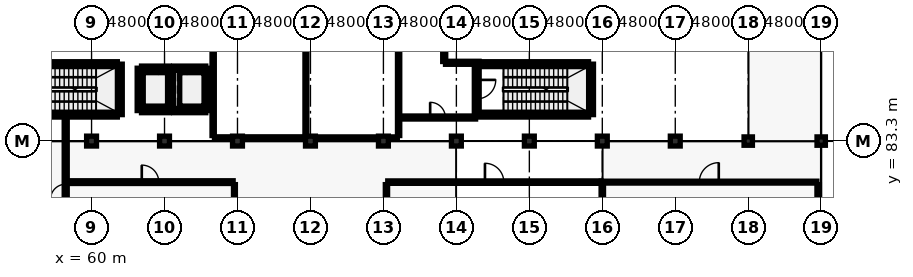
"""IFC4 building model, lengths in metres.
Left out: names, types, materials, properties, quantities, classifications, styles, units other than length and angle.
Written with IfcOpenShell. Run it as: python <this file> out.ifc"""

import sys

from ifc_helpers import new_model, si_unit, direction, frame, frame_2d, origin, origin_2d, place, context, subcontext, project, spatial, rectangle, extrude, element, fill, save


model = new_model("IFC4")
c1 = context("Model", 3, precision=1e-05, world=origin(), true_north=direction((0.0, 1.0)))
c2 = subcontext(c1, "Body", "Model", "MODEL_VIEW")
j1 = project(units=[si_unit("LENGTHUNIT", "METRE"), si_unit("PLANEANGLEUNIT", "RADIAN")], contexts=[c1])
p1 = place(None, origin())
s1 = spatial("IfcSite", under=j1, at=p1, CompositionType="ELEMENT")
p2 = place(p1, origin())
s2 = spatial("IfcBuilding", under=s1, at=p2, CompositionType="ELEMENT")
p3 = place(p2, origin())
s3 = spatial("IfcBuildingStorey", under=s2, at=p3, CompositionType="ELEMENT", Elevation=0.0)
for number, where, z_axis, x_axis in (
    (1, (60.0, 83.3, 0.0), (0.0, 0.0, 1.0), (1.0, 0.0, 0.0)),
    (2, (64.8, 83.3, 0.0), (0.0, 0.0, 1.0), (1.0, 0.0, 0.0)),
    (3, (69.6, 83.3, 0.0), (0.0, 0.0, 1.0), (1.0, 0.0, 0.0)),
    (4, (74.4, 83.3, 0.0), (0.0, 0.0, 1.0), (1.0, 0.0, 0.0)),
    (5, (79.2, 83.3, 0.0), (0.0, 0.0, 1.0), (1.0, 0.0, 0.0)),
    (6, (84.0, 83.3, 0.0), (0.0, 0.0, 1.0), (1.0, 0.0, 0.0)),
    (7, (88.8, 83.3, 0.0), (0.0, 0.0, 1.0), (1.0, 0.0, 0.0)),
    (8, (93.6, 83.3, 0.0), (0.0, 0.0, 1.0), (1.0, 0.0, 0.0)),
    (9, (98.4, 83.3, 0.0), (0.0, 0.0, 1.0), (1.0, 0.0, 0.0)),
):
    element("IfcColumn", number, at=place(p3, frame(where, z_axis=z_axis, x_axis=x_axis)), inside=s3, PredefinedType="COLUMN", context=c2, shape_type="SweptSolid", body=[
        extrude(rectangle(XDim=0.65, YDim=0.65, at=origin_2d()), origin(), (0.0, 0.0, 1.0), 4.7),
    ])
for number, where, z_axis, x_axis in (
    (10, (103.2, 83.3, 0.0), (0.0, 0.0, 1.0), (1.0, 0.0, 0.0)),
    (11, (108.0, 83.3, 0.0), (0.0, 0.0, 1.0), (1.0, 0.0, 0.0)),
):
    element("IfcColumn", number, at=place(p3, frame(where, z_axis=z_axis, x_axis=x_axis)), inside=s3, PredefinedType="COLUMN", context=c2, shape_type="SweptSolid", body=[
        extrude(rectangle(XDim=0.55, YDim=0.55, at=origin_2d()), origin(), (0.0, 0.0, 1.0), 4.7),
    ])
p4 = place(p3, frame((54.505, 85.04, 0.0), z_axis=(0.0, 0.0, 1.0), x_axis=(1.0, 0.0, 0.0)))
e12 = element("IfcWall", 12, at=p4, inside=s3, PredefinedType="SHEAR", context=c2, shape_type="SweptSolid", body=[
    extrude(rectangle(XDim=7.19, YDim=0.32, at=frame_2d((3.595, 0.0))), origin(), (0.0, 0.0, 1.0), 4.7),
])
p5 = place(p3, frame((61.86, 85.04, 0.0), z_axis=(0.0, 0.0, 1.0), x_axis=(0.0, 1.0, 0.0)))
e13 = element("IfcWall", 13, at=p5, inside=s3, PredefinedType="SHEAR", context=c2, shape_type="SweptSolid", body=[
    extrude(rectangle(XDim=3.32, YDim=0.32, at=frame_2d((1.66, 0.0))), origin(), (0.0, 0.0, 1.0), 4.7),
])
p6 = place(p3, frame((61.695, 88.36, 0.0), z_axis=(0.0, 0.0, 1.0), x_axis=(-1.0, 0.0, 0.0)))
e14 = element("IfcWall", 14, at=p6, inside=s3, PredefinedType="SHEAR", context=c2, shape_type="SweptSolid", body=[
    extrude(rectangle(XDim=7.19, YDim=0.32, at=frame_2d((3.595, 0.0))), origin(), (0.0, 0.0, 1.0), 4.7),
])
p7 = place(p3, frame((63.286, 85.307, 0.0), z_axis=(0.0, 0.0, 1.0), x_axis=(1.0, 0.0, 0.0)))
e15 = element("IfcWall", 15, at=p7, inside=s3, PredefinedType="SHEAR", context=c2, shape_type="SweptSolid", body=[
    extrude(rectangle(XDim=1.828, YDim=0.28, at=frame_2d((0.914, 0.0))), origin(), (0.0, 0.0, 1.0), 4.7),
])
p8 = place(p3, frame((65.259, 85.307, 0.0), z_axis=(0.0, 0.0, 1.0), x_axis=(0.0, 1.0, 0.0)))
e16 = element("IfcWall", 16, at=p8, inside=s3, PredefinedType="SHEAR", context=c2, shape_type="SweptSolid", body=[
    extrude(rectangle(XDim=2.787, YDim=0.28, at=frame_2d((1.393, 0.0))), origin(), (0.0, 0.0, 1.0), 4.7),
])
p9 = place(p3, frame((65.114, 88.093, 0.0), z_axis=(0.0, 0.0, 1.0), x_axis=(-1.0, 0.0, 0.0)))
e17 = element("IfcWall", 17, at=p9, inside=s3, PredefinedType="SHEAR", context=c2, shape_type="SweptSolid", body=[
    extrude(rectangle(XDim=1.828, YDim=0.28, at=frame_2d((0.914, 0.0))), origin(), (0.0, 0.0, 1.0), 4.7),
])
p10 = place(p9, frame((0.314, 0.0, 0.0)))
e18 = element("IfcOpeningElement", 18, at=p10, cuts=e17, PredefinedType="OPENING", context=c2, shape_type="SweptSolid", body=[
    extrude(rectangle(XDim=1.2, YDim=2.15, at=frame_2d((0.6, 1.075))), frame((0.0, 0.152, 0.0), z_axis=(0.0, -1.0, 0.0), x_axis=(1.0, 0.0, 0.0)), (0.0, 0.0, 1.0), 0.304),
])
p11 = place(p3, frame((63.141, 88.093, 0.0), z_axis=(0.0, 0.0, 1.0), x_axis=(0.0, -1.0, 0.0)))
e19 = element("IfcWall", 19, at=p11, inside=s3, PredefinedType="SHEAR", context=c2, shape_type="SweptSolid", body=[
    extrude(rectangle(XDim=2.787, YDim=0.28, at=frame_2d((1.393, 0.0))), origin(), (0.0, 0.0, 1.0), 4.7),
])
p12 = place(p3, frame((65.404, 85.307, 0.0), z_axis=(0.0, 0.0, 1.0), x_axis=(1.0, 0.0, 0.0)))
e20 = element("IfcWall", 20, at=p12, inside=s3, PredefinedType="SHEAR", context=c2, shape_type="SweptSolid", body=[
    extrude(rectangle(XDim=2.11, YDim=0.28, at=frame_2d((1.055, 0.0))), origin(), (0.0, 0.0, 1.0), 4.7),
])
p13 = place(p3, frame((67.659, 85.307, 0.0), z_axis=(0.0, 0.0, 1.0), x_axis=(0.0, 1.0, 0.0)))
e21 = element("IfcWall", 21, at=p13, inside=s3, PredefinedType="SHEAR", context=c2, shape_type="SweptSolid", body=[
    extrude(rectangle(XDim=2.787, YDim=0.28, at=frame_2d((1.393, 0.0))), origin(), (0.0, 0.0, 1.0), 4.7),
])
p14 = place(p3, frame((67.514, 88.093, 0.0), z_axis=(0.0, 0.0, 1.0), x_axis=(-1.0, 0.0, 0.0)))
e22 = element("IfcWall", 22, at=p14, inside=s3, PredefinedType="SHEAR", context=c2, shape_type="SweptSolid", body=[
    extrude(rectangle(XDim=2.11, YDim=0.28, at=frame_2d((1.055, 0.0))), origin(), (0.0, 0.0, 1.0), 4.7),
])
p15 = place(p14, frame((0.455, 0.0, 0.0)))
e23 = element("IfcOpeningElement", 23, at=p15, cuts=e22, PredefinedType="OPENING", context=c2, shape_type="SweptSolid", body=[
    extrude(rectangle(XDim=1.2, YDim=2.15, at=frame_2d((0.6, 1.075))), frame((0.0, 0.152, 0.0), z_axis=(0.0, -1.0, 0.0), x_axis=(1.0, 0.0, 0.0)), (0.0, 0.0, 1.0), 0.304),
])
p16 = place(p3, frame((85.505, 85.04, 0.0), z_axis=(0.0, 0.0, 1.0), x_axis=(1.0, 0.0, 0.0)))
e24 = element("IfcWall", 24, at=p16, inside=s3, PredefinedType="SHEAR", context=c2, shape_type="SweptSolid", body=[
    extrude(rectangle(XDim=7.19, YDim=0.32, at=frame_2d((3.595, 0.0))), origin(), (0.0, 0.0, 1.0), 4.7),
])
p17 = place(p3, frame((92.86, 85.04, 0.0), z_axis=(0.0, 0.0, 1.0), x_axis=(0.0, 1.0, 0.0)))
e25 = element("IfcWall", 25, at=p17, inside=s3, PredefinedType="SHEAR", context=c2, shape_type="SweptSolid", body=[
    extrude(rectangle(XDim=3.32, YDim=0.32, at=frame_2d((1.66, 0.0))), origin(), (0.0, 0.0, 1.0), 4.7),
])
p18 = place(p3, frame((92.695, 88.36, 0.0), z_axis=(0.0, 0.0, 1.0), x_axis=(-1.0, 0.0, 0.0)))
e26 = element("IfcWall", 26, at=p18, inside=s3, PredefinedType="SHEAR", context=c2, shape_type="SweptSolid", body=[
    extrude(rectangle(XDim=7.19, YDim=0.32, at=frame_2d((3.595, 0.0))), origin(), (0.0, 0.0, 1.0), 4.7),
])
p19 = place(p3, frame((85.34, 88.36, 0.0), z_axis=(0.0, 0.0, 1.0), x_axis=(0.0, -1.0, 0.0)))
e27 = element("IfcWall", 27, at=p19, inside=s3, PredefinedType="SHEAR", context=c2, shape_type="SweptSolid", body=[
    extrude(rectangle(XDim=3.32, YDim=0.32, at=frame_2d((1.66, 0.0))), origin(), (0.0, 0.0, 1.0), 4.7),
])
p20 = place(p19, frame((1.035, 0.0, 0.0)))
e28 = element("IfcOpeningElement", 28, at=p20, cuts=e27, PredefinedType="OPENING", context=c2, shape_type="SweptSolid", body=[
    extrude(rectangle(XDim=1.25, YDim=2.2, at=frame_2d((0.625, 1.1))), frame((0.0, 0.172, 0.0), z_axis=(0.0, -1.0, 0.0), x_axis=(1.0, 0.0, 0.0)), (0.0, 0.0, 1.0), 0.344),
])
p21 = place(p3, frame((58.3, 76.002, 0.0), z_axis=(0.0, 0.0, 1.0), x_axis=(0.0, 1.0, 0.0)))
e29 = element("IfcWall", 29, at=p21, inside=s3, PredefinedType="PARTITIONING", context=c2, shape_type="SweptSolid", body=[
    extrude(rectangle(XDim=8.866, YDim=0.2, at=frame_2d((4.433, 0.0))), origin(), (0.0, 0.0, 1.0), 4.035),
])
p22 = place(p21, frame((3.461, 0.0, 0.0)))
e30 = element("IfcOpeningElement", 30, at=p22, cuts=e29, PredefinedType="OPENING", context=c2, shape_type="SweptSolid", body=[
    extrude(rectangle(XDim=1.0, YDim=2.15, at=frame_2d((0.5, 1.075))), frame((0.0, 0.112, 0.0), z_axis=(0.0, -1.0, 0.0), x_axis=(1.0, 0.0, 0.0)), (0.0, 0.0, 1.0), 0.224),
])
p23 = place(p3, frame((80.285, 84.85, 0.0), z_axis=(0.0, 0.0, 1.0), x_axis=(1.0, 0.0, 0.0)))
e31 = element("IfcWall", 31, at=p23, inside=s3, PredefinedType="PARTITIONING", context=c2, shape_type="SweptSolid", body=[
    extrude(rectangle(XDim=4.98, YDim=0.2, at=frame_2d((2.49, 0.0))), origin(), (0.0, 0.0, 1.0), 3.985),
])
p24 = place(p23, frame((1.99, 0.0, 0.0)))
e32 = element("IfcOpeningElement", 32, at=p24, cuts=e31, PredefinedType="OPENING", context=c2, shape_type="SweptSolid", body=[
    extrude(rectangle(XDim=1.0, YDim=2.15, at=frame_2d((0.5, 1.075))), frame((0.0, 0.112, 0.0), z_axis=(0.0, -1.0, 0.0), x_axis=(1.0, 0.0, 0.0)), (0.0, 0.0, 1.0), 0.224),
])
p25 = place(p3, frame((58.412, 80.6, 0.0), z_axis=(0.0, 0.0, 1.0), x_axis=(1.0, 0.0, 0.0)))
e33 = element("IfcWall", 33, at=p25, inside=s3, PredefinedType="PARTITIONING", context=c2, shape_type="SweptSolid", body=[
    extrude(rectangle(XDim=10.903, YDim=0.18, at=frame_2d((5.451, 0.0))), origin(), (0.0, 0.0, 1.0), 4.7),
])
p26 = place(p25, frame((4.892, 0.0, 0.0)))
e34 = element("IfcOpeningElement", 34, at=p26, cuts=e33, PredefinedType="OPENING", context=c2, shape_type="SweptSolid", body=[
    extrude(rectangle(XDim=1.12, YDim=2.2, at=frame_2d((0.56, 1.1))), frame((0.0, 0.102, 0.0), z_axis=(0.0, -1.0, 0.0), x_axis=(1.0, 0.0, 0.0)), (0.0, 0.0, 1.0), 0.204),
])
p27 = place(p3, frame((79.485, 80.6, 0.0), z_axis=(0.0, 0.0, 1.0), x_axis=(1.0, 0.0, 0.0)))
e35 = element("IfcWall", 35, at=p27, inside=s3, PredefinedType="PARTITIONING", context=c2, shape_type="SweptSolid", body=[
    extrude(rectangle(XDim=14.03, YDim=0.16, at=frame_2d((7.015, 0.0))), origin(), (0.0, 0.0, 1.0), 3.985),
])
p28 = place(p27, frame((6.395, 0.0, 0.0)))
e36 = element("IfcOpeningElement", 36, at=p28, cuts=e35, PredefinedType="OPENING", context=c2, shape_type="SweptSolid", body=[
    extrude(rectangle(XDim=1.24, YDim=2.2, at=frame_2d((0.62, 1.1))), frame((0.0, 0.092, 0.0), z_axis=(0.0, -1.0, 0.0), x_axis=(1.0, 0.0, 0.0)), (0.0, 0.0, 1.0), 0.184),
])
p29 = place(p3, frame((93.527, 80.6, 0.0), z_axis=(0.0, 0.0, 1.0), x_axis=(1.0, 0.0, 0.0)))
e37 = element("IfcWall", 37, at=p29, inside=s3, PredefinedType="PARTITIONING", context=c2, shape_type="SweptSolid", body=[
    extrude(rectangle(XDim=14.188, YDim=0.125, at=frame_2d((7.094, 0.0))), origin(), (0.0, 0.0, 1.0), 4.035),
])
p30 = place(p29, frame((6.454, 0.0, 0.0)))
e38 = element("IfcOpeningElement", 38, at=p30, cuts=e37, PredefinedType="OPENING", context=c2, shape_type="SweptSolid", body=[
    extrude(rectangle(XDim=1.28, YDim=2.22, at=frame_2d((0.64, 1.11))), frame((0.0, 0.074, 0.0), z_axis=(0.0, -1.0, 0.0), x_axis=(1.0, 0.0, 0.0)), (0.0, 0.0, 1.0), 0.149),
])
p31 = place(p3, frame((68.085, 83.5, 0.0), z_axis=(0.0, 0.0, 1.0), x_axis=(1.0, 0.0, 0.0)))
e39 = element("IfcWall", 39, at=p31, inside=s3, PredefinedType="PARTITIONING", context=c2, shape_type="SweptSolid", body=[
    extrude(rectangle(XDim=5.978, YDim=0.16, at=frame_2d((2.989, 0.0))), origin(), (0.0, 0.0, 1.0), 3.985),
])
p32 = place(p3, frame((74.555, 83.5, 0.0), z_axis=(0.0, 0.0, 1.0), x_axis=(1.0, 0.0, 0.0)))
e40 = element("IfcWall", 40, at=p32, inside=s3, PredefinedType="PARTITIONING", context=c2, shape_type="SweptSolid", body=[
    extrude(rectangle(XDim=5.56, YDim=0.15, at=frame_2d((2.78, 0.0))), origin(), (0.0, 0.0, 1.0), 3.985),
])
p33 = place(p3, frame((68.0, 83.665, 0.0), z_axis=(0.0, 0.0, 1.0), x_axis=(0.0, 1.0, 0.0)))
e41 = element("IfcWall", 41, at=p33, inside=s3, PredefinedType="PARTITIONING", context=c2, shape_type="SweptSolid", body=[
    extrude(rectangle(XDim=9.37, YDim=0.15, at=frame_2d((4.685, 0.0))), origin(), (0.0, 0.0, 1.0), 4.035),
])
p34 = place(p3, frame((74.1, 83.637, 0.0), z_axis=(0.0, 0.0, 1.0), x_axis=(0.0, 1.0, 0.0)))
e42 = element("IfcWall", 42, at=p34, inside=s3, PredefinedType="PARTITIONING", context=c2, shape_type="SweptSolid", body=[
    extrude(rectangle(XDim=9.461, YDim=0.125, at=frame_2d((4.73, 0.0))), origin(), (0.0, 0.0, 1.0), 3.985),
])
p35 = place(p3, frame((80.2, 83.665, 0.0), z_axis=(0.0, 0.0, 1.0), x_axis=(0.0, 1.0, 0.0)))
e43 = element("IfcWall", 43, at=p35, inside=s3, PredefinedType="PARTITIONING", context=c2, shape_type="SweptSolid", body=[
    extrude(rectangle(XDim=9.608, YDim=0.15, at=frame_2d((4.804, 0.0))), origin(), (0.0, 0.0, 1.0), 4.035),
])
p36 = place(p3, frame((83.285, 88.45, 0.0), z_axis=(0.0, 0.0, 1.0), x_axis=(1.0, 0.0, 0.0)))
e44 = element("IfcWall", 44, at=p36, inside=s3, PredefinedType="PARTITIONING", context=c2, shape_type="SweptSolid", body=[
    extrude(rectangle(XDim=2.208, YDim=0.2, at=frame_2d((1.104, 0.0))), origin(), (0.0, 0.0, 1.0), 3.985),
])
p37 = place(p3, frame((83.2, 88.535, 0.0), z_axis=(0.0, 0.0, 1.0), x_axis=(0.0, 1.0, 0.0)))
e45 = element("IfcWall", 45, at=p37, inside=s3, PredefinedType="PARTITIONING", context=c2, shape_type="SweptSolid", body=[
    extrude(rectangle(XDim=4.738, YDim=0.2, at=frame_2d((2.369, 0.0))), origin(), (0.0, 0.0, 1.0), 4.085),
])
p38 = place(p3, frame((69.4, 76.068, 0.0), z_axis=(0.0, 0.0, 1.0), x_axis=(0.0, 1.0, 0.0)))
e46 = element("IfcWall", 46, at=p38, inside=s3, PredefinedType="PARTITIONING", context=c2, shape_type="SweptSolid", body=[
    extrude(rectangle(XDim=4.367, YDim=0.125, at=frame_2d((2.184, 0.0))), origin(), (0.0, 0.0, 1.0), 4.035),
])
p39 = place(p3, frame((79.4, 76.068, 0.0), z_axis=(0.0, 0.0, 1.0), x_axis=(0.0, 1.0, 0.0)))
e47 = element("IfcWall", 47, at=p39, inside=s3, PredefinedType="PARTITIONING", context=c2, shape_type="SweptSolid", body=[
    extrude(rectangle(XDim=4.367, YDim=0.15, at=frame_2d((2.184, 0.0))), origin(), (0.0, 0.0, 1.0), 4.035),
])
p40 = place(p3, frame((93.6, 76.137, 0.0), z_axis=(0.0, 0.0, 1.0), x_axis=(0.0, 1.0, 0.0)))
e48 = element("IfcWall", 48, at=p40, inside=s3, PredefinedType="PARTITIONING", context=c2, shape_type="SweptSolid", body=[
    extrude(rectangle(XDim=4.388, YDim=0.16, at=frame_2d((2.194, 0.0))), origin(), (0.0, 0.0, 1.0), 4.135),
])
p41 = place(p3, frame((107.8, 76.068, 0.0), z_axis=(0.0, 0.0, 1.0), x_axis=(0.0, 1.0, 0.0)))
e49 = element("IfcWall", 49, at=p41, inside=s3, PredefinedType="PARTITIONING", context=c2, shape_type="SweptSolid", body=[
    extrude(rectangle(XDim=4.367, YDim=0.16, at=frame_2d((2.184, 0.0))), origin(), (0.0, 0.0, 1.0), 4.035),
])
p42 = place(p10, origin())
e50 = element("IfcDoor", 50, at=p42, inside=s3, OperationType="SLIDING_TO_LEFT", PredefinedType="DOOR", context=c2, shape_type="SweptSolid", body=[
    extrude(rectangle(XDim=1.2, YDim=2.15, at=frame_2d((0.6, 1.075))), frame((0.0, 0.025, 0.0), z_axis=(0.0, -1.0, 0.0), x_axis=(1.0, 0.0, 0.0)), (0.0, 0.0, 1.0), 0.05),
])
fill(e18, e50)
p43 = place(p15, origin())
e51 = element("IfcDoor", 51, at=p43, inside=s3, OperationType="SLIDING_TO_RIGHT", PredefinedType="DOOR", context=c2, shape_type="SweptSolid", body=[
    extrude(rectangle(XDim=1.2, YDim=2.15, at=frame_2d((0.6, 1.075))), frame((0.0, 0.025, 0.0), z_axis=(0.0, -1.0, 0.0), x_axis=(1.0, 0.0, 0.0)), (0.0, 0.0, 1.0), 0.05),
])
fill(e23, e51)
p44 = place(p20, origin())
e52 = element("IfcDoor", 52, at=p44, inside=s3, OperationType="SINGLE_SWING_LEFT", PredefinedType="DOOR", context=c2, shape_type="SweptSolid", body=[
    extrude(rectangle(XDim=1.25, YDim=2.2, at=frame_2d((0.625, 1.1))), frame((0.0, 0.025, 0.0), z_axis=(0.0, -1.0, 0.0), x_axis=(1.0, 0.0, 0.0)), (0.0, 0.0, 1.0), 0.05),
])
fill(e28, e52)
p45 = place(p22, origin())
e53 = element("IfcDoor", 53, at=p45, inside=s3, OperationType="SINGLE_SWING_LEFT", PredefinedType="DOOR", context=c2, shape_type="SweptSolid", body=[
    extrude(rectangle(XDim=1.0, YDim=2.15, at=frame_2d((0.5, 1.075))), frame((0.0, 0.025, 0.0), z_axis=(0.0, -1.0, 0.0), x_axis=(1.0, 0.0, 0.0)), (0.0, 0.0, 1.0), 0.05),
])
fill(e30, e53)
p46 = place(p24, origin())
e54 = element("IfcDoor", 54, at=p46, inside=s3, OperationType="SINGLE_SWING_LEFT", PredefinedType="DOOR", context=c2, shape_type="SweptSolid", body=[
    extrude(rectangle(XDim=1.0, YDim=2.15, at=frame_2d((0.5, 1.075))), frame((0.0, 0.025, 0.0), z_axis=(0.0, -1.0, 0.0), x_axis=(1.0, 0.0, 0.0)), (0.0, 0.0, 1.0), 0.05),
])
fill(e32, e54)
p47 = place(p26, origin())
e55 = element("IfcDoor", 55, at=p47, inside=s3, OperationType="SINGLE_SWING_LEFT", PredefinedType="DOOR", context=c2, shape_type="SweptSolid", body=[
    extrude(rectangle(XDim=1.12, YDim=2.2, at=frame_2d((0.56, 1.1))), frame((0.0, 0.025, 0.0), z_axis=(0.0, -1.0, 0.0), x_axis=(1.0, 0.0, 0.0)), (0.0, 0.0, 1.0), 0.05),
])
fill(e34, e55)
p48 = place(p28, origin())
e56 = element("IfcDoor", 56, at=p48, inside=s3, OperationType="SINGLE_SWING_LEFT", PredefinedType="DOOR", context=c2, shape_type="SweptSolid", body=[
    extrude(rectangle(XDim=1.24, YDim=2.2, at=frame_2d((0.62, 1.1))), frame((0.0, 0.025, 0.0), z_axis=(0.0, -1.0, 0.0), x_axis=(1.0, 0.0, 0.0)), (0.0, 0.0, 1.0), 0.05),
])
fill(e36, e56)
p49 = place(p30, origin())
e57 = element("IfcDoor", 57, at=p49, inside=s3, OperationType="SINGLE_SWING_RIGHT", PredefinedType="DOOR", context=c2, shape_type="SweptSolid", body=[
    extrude(rectangle(XDim=1.28, YDim=2.22, at=frame_2d((0.64, 1.11))), frame((0.0, 0.025, 0.0), z_axis=(0.0, -1.0, 0.0), x_axis=(1.0, 0.0, 0.0)), (0.0, 0.0, 1.0), 0.05),
])
fill(e38, e57)
save(model, sys.argv[1])
